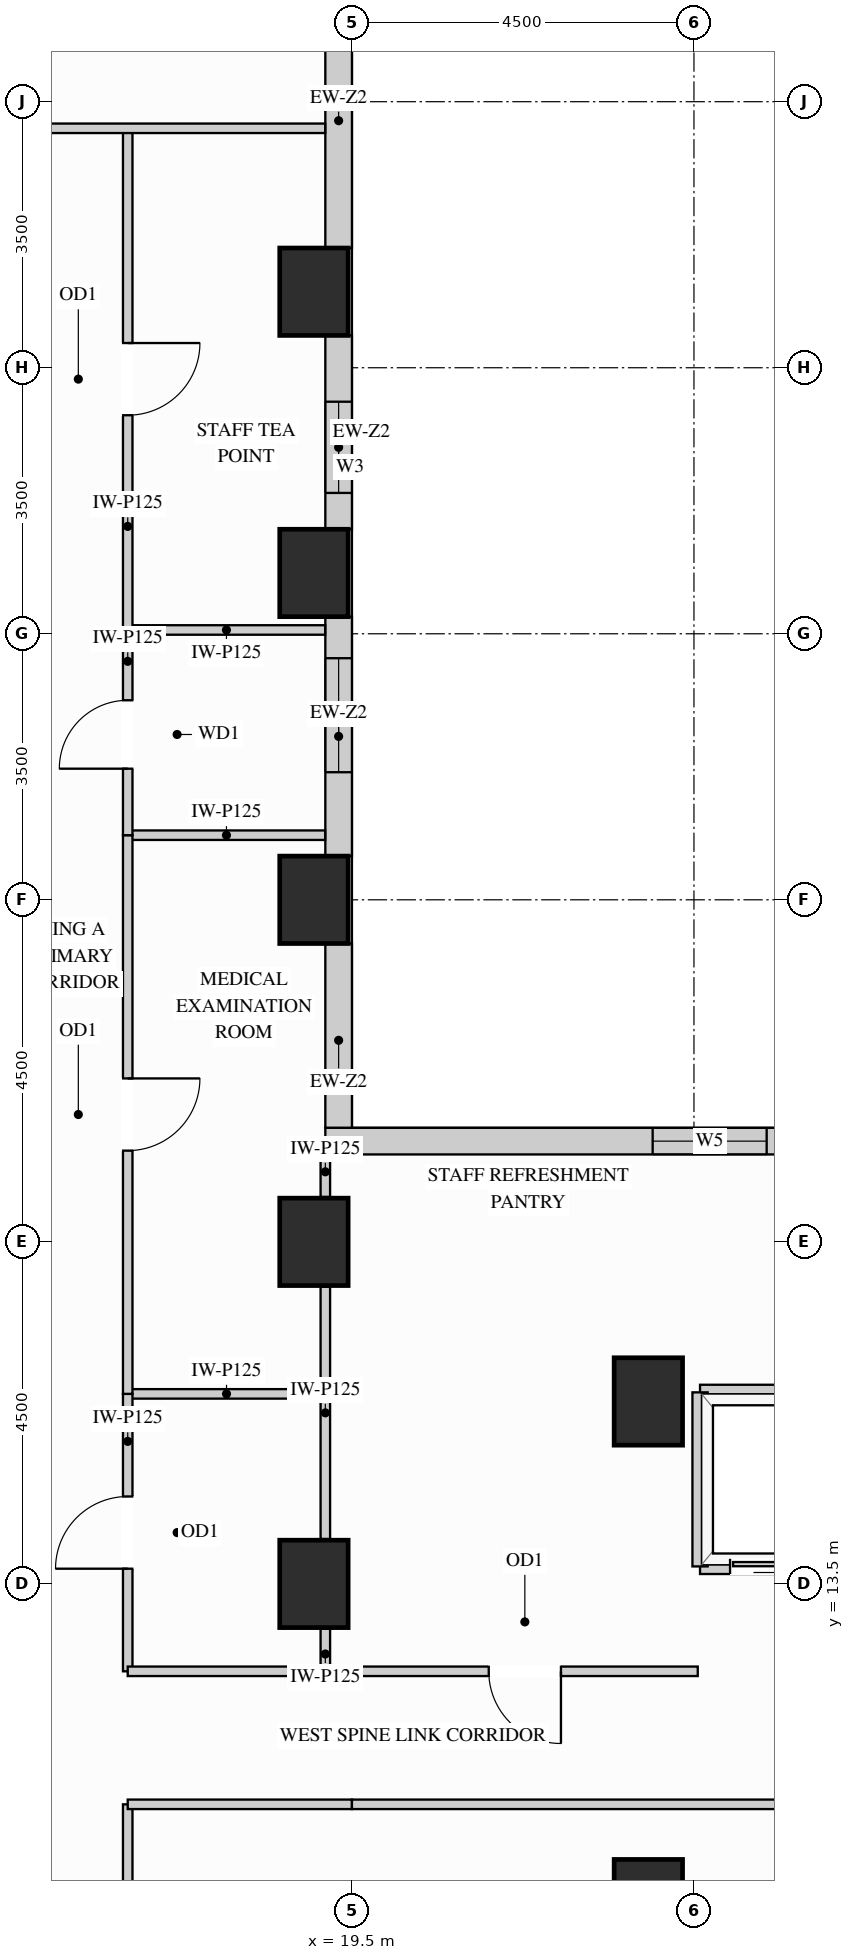
"""IFC4 building model, lengths in metres.
Left out: names, types, materials, properties, quantities, classifications, styles, units other than length and angle.
Written with IfcOpenShell. Run it as: python <this file> out.ifc"""

import sys

from ifc_helpers import new_model, si_unit, direction, frame, frame_2d, origin, origin_2d, place, context, subcontext, project, spatial, rectangle, extrude, source, transform, mapped, element, fill, save


model = new_model("IFC4")
c1 = context("Model", 3, precision=1e-05, world=origin(), true_north=direction((0.0, 1.0)))
c2 = subcontext(c1, "Body", "Model", "MODEL_VIEW")
j1 = project(units=[si_unit("LENGTHUNIT", "METRE"), si_unit("PLANEANGLEUNIT", "RADIAN")], contexts=[c1])
p1 = place(None, origin())
s1 = spatial("IfcSite", under=j1, at=p1, CompositionType="ELEMENT")
p2 = place(p1, origin())
s2 = spatial("IfcBuilding", under=s1, at=p2, CompositionType="ELEMENT")
p3 = place(p2, frame((0.0, 0.0, 91.8)))
s3 = spatial("IfcBuildingStorey", under=s2, at=p3, CompositionType="ELEMENT", Elevation=91.8)
m1 = source(origin(), c2, "Body", "SweptSolid", [
    extrude(rectangle(XDim=0.9, YDim=1.15, at=origin_2d()), origin(), (0.0, 0.0, 1.0), 3.38),
])
for number, where, z_axis, x_axis in (
    (1, (19.0, 13.5, 0.0), (0.0, 0.0, 1.0), (1.0, 0.0, 0.0)),
    (2, (19.0, 18.0, 0.0), (0.0, 0.0, 1.0), (1.0, 0.0, 0.0)),
    (3, (19.0, 22.5, 0.0), (0.0, 0.0, 1.0), (1.0, 0.0, 0.0)),
    (4, (19.0, 26.8, 0.0), (0.0, 0.0, 1.0), (1.0, 0.0, 0.0)),
    (5, (19.0, 30.5, 0.0), (0.0, 0.0, 1.0), (1.0, 0.0, 0.0)),
    (6, (23.4, 15.9, 0.0), (0.0, 0.0, 1.0), (1.0, 0.0, 0.0)),
    (7, (23.4, 9.3, 0.0), (0.0, 0.0, 1.0), (1.0, 0.0, 0.0)),
):
    element("IfcColumn", number, at=place(p3, frame(where, z_axis=z_axis, x_axis=x_axis)), inside=s3, PredefinedType="COLUMN", context=c2, shape_type="MappedRepresentation", body=[
        mapped(m1, transform((0.0, 0.0, 0.0), x_axis=(1.0, 0.0, 0.0), y_axis=(0.0, 1.0, 0.0), z_axis=(0.0, 0.0, 1.0))),
    ])
m2 = source(origin(), c2, "Body", "SweptSolid", [
    extrude(rectangle(XDim=2.429, YDim=0.35, at=frame_2d((1.214, 0.0))), origin(), (0.0, 0.0, 1.0), 2.519),
])
p4 = place(p3, frame((19.325, 19.498, 0.0), z_axis=(0.0, 0.0, 1.0), x_axis=(0.0, 1.0, 0.0)))
e8 = element("IfcWall", 8, at=p4, inside=s3, PredefinedType="SOLIDWALL", context=c2, shape_type="MappedRepresentation", body=[
    mapped(m2, transform((0.0, 0.0, 0.0), x_axis=(1.0, 0.0, 0.0), y_axis=(0.0, 1.0, 0.0), z_axis=(0.0, 0.0, 1.0))),
])
p5 = place(p3, frame((19.325, 23.073, 0.0), z_axis=(0.0, 0.0, 1.0), x_axis=(0.0, 1.0, 0.0)))
e9 = element("IfcWall", 9, at=p5, inside=s3, PredefinedType="SOLIDWALL", context=c2, shape_type="SweptSolid", body=[
    extrude(rectangle(XDim=3.154, YDim=0.35, at=frame_2d((1.577, 0.0))), origin(), (0.0, 0.0, 1.0), 2.519),
])
p6 = place(p5, frame((1.105, 0.0, 0.78)))
e10 = element("IfcOpeningElement", 10, at=p6, cuts=e9, PredefinedType="OPENING", context=c2, shape_type="SweptSolid", body=[
    extrude(rectangle(XDim=1.5, YDim=1.559, at=frame_2d((0.75, 0.78))), frame((0.0, 0.185, 0.0), z_axis=(0.0, -1.0, 0.0), x_axis=(1.0, 0.0, 0.0)), (0.0, 0.0, 1.0), 0.37),
])
p7 = place(p3, frame((19.325, 27.373, 0.0), z_axis=(0.0, 0.0, 1.0), x_axis=(0.0, 1.0, 0.0)))
e11 = element("IfcWall", 11, at=p7, inside=s3, PredefinedType="SOLIDWALL", context=c2, shape_type="SweptSolid", body=[
    extrude(rectangle(XDim=2.554, YDim=0.35, at=frame_2d((1.277, 0.0))), origin(), (0.0, 0.0, 1.0), 2.519),
])
p8 = place(p7, frame((0.48, 0.0, 0.78)))
e12 = element("IfcOpeningElement", 12, at=p8, cuts=e11, PredefinedType="OPENING", context=c2, shape_type="SweptSolid", body=[
    extrude(rectangle(XDim=1.2, YDim=1.559, at=frame_2d((0.6, 0.78))), frame((0.0, 0.185, 0.0), z_axis=(0.0, -1.0, 0.0), x_axis=(1.0, 0.0, 0.0)), (0.0, 0.0, 1.0), 0.37),
])
m3 = source(origin(), c2, "Body", "SweptSolid", [
    extrude(rectangle(XDim=3.354, YDim=0.35, at=frame_2d((1.677, 0.0))), origin(), (0.0, 0.0, 1.0), 2.519),
])
p9 = place(p3, frame((19.325, 31.073, 0.0), z_axis=(0.0, 0.0, 1.0), x_axis=(0.0, 1.0, 0.0)))
e13 = element("IfcWall", 13, at=p9, inside=s3, PredefinedType="SOLIDWALL", context=c2, shape_type="MappedRepresentation", body=[
    mapped(m3, transform((0.0, 0.0, 0.0), x_axis=(1.0, 0.0, 0.0), y_axis=(0.0, 1.0, 0.0), z_axis=(0.0, 0.0, 1.0))),
])
p10 = place(p3, frame((34.75, 19.325, 0.0), z_axis=(0.0, 0.0, 1.0), x_axis=(-1.0, 0.0, 0.0)))
e14 = element("IfcWall", 14, at=p10, inside=s3, PredefinedType="SOLIDWALL", context=c2, shape_type="SweptSolid", body=[
    extrude(rectangle(XDim=15.6, YDim=0.35, at=frame_2d((7.8, 0.0))), origin(), (0.0, 0.0, 1.0), 3.365),
])
p11 = place(p10, frame((4.307, 0.0, 0.78)))
e15 = element("IfcOpeningElement", 15, at=p11, cuts=e14, PredefinedType="OPENING", context=c2, shape_type="SweptSolid", body=[
    extrude(rectangle(XDim=1.5, YDim=2.0, at=frame_2d((0.75, 1.0))), frame((0.0, 0.185, 0.0), z_axis=(0.0, -1.0, 0.0), x_axis=(1.0, 0.0, 0.0)), (0.0, 0.0, 1.0), 0.37),
])
p12 = place(p10, frame((9.793, 0.0, 0.78)))
e16 = element("IfcOpeningElement", 16, at=p12, cuts=e14, PredefinedType="OPENING", context=c2, shape_type="SweptSolid", body=[
    extrude(rectangle(XDim=1.5, YDim=2.0, at=frame_2d((0.75, 1.0))), frame((0.0, 0.185, 0.0), z_axis=(0.0, -1.0, 0.0), x_axis=(1.0, 0.0, 0.0)), (0.0, 0.0, 1.0), 0.37),
])
m4 = source(origin(), c2, "Body", "SweptSolid", [
    extrude(rectangle(XDim=2.6, YDim=0.125, at=frame_2d((1.3, 0.0))), origin(), (0.0, 0.0, 1.0), 3.365),
])
p13 = place(p3, frame((16.55, 16.0, 0.0), z_axis=(0.0, 0.0, 1.0), x_axis=(1.0, 0.0, 0.0)))
e17 = element("IfcWall", 17, at=p13, inside=s3, PredefinedType="PARTITIONING", context=c2, shape_type="MappedRepresentation", body=[
    mapped(m4, transform((0.0, 0.0, 0.0), x_axis=(1.0, 0.0, 0.0), y_axis=(0.0, 1.0, 0.0), z_axis=(0.0, 0.0, 1.0))),
])
m5 = source(origin(), c2, "Body", "SweptSolid", [
    extrude(rectangle(XDim=2.598, YDim=0.125, at=frame_2d((1.299, 0.0))), origin(), (0.0, 0.0, 1.0), 3.365),
])
for number, where, z_axis, x_axis in (
    (18, (16.55, 23.35, 0.0), (0.0, 0.0, 1.0), (1.0, 0.0, 0.0)),
    (19, (16.55, 26.05, 0.0), (0.0, 0.0, 1.0), (1.0, 0.0, 0.0)),
):
    element("IfcWall", number, at=place(p3, frame(where, z_axis=z_axis, x_axis=x_axis)), inside=s3, PredefinedType="PARTITIONING", context=c2, shape_type="MappedRepresentation", body=[
        mapped(m5, transform((0.0, 0.0, 0.0), x_axis=(1.0, 0.0, 0.0), y_axis=(0.0, 1.0, 0.0), z_axis=(0.0, 0.0, 1.0))),
    ])
m6 = source(origin(), c2, "Body", "SweptSolid", [
    extrude(rectangle(XDim=0.56, YDim=0.125, at=frame_2d((0.28, 0.0))), origin(), (0.0, 0.0, 1.0), 2.677),
])
p14 = place(p3, frame((19.15, 12.35, 0.0), z_axis=(0.0, 0.0, 1.0), x_axis=(0.0, 1.0, 0.0)))
e20 = element("IfcWall", 20, at=p14, inside=s3, PredefinedType="PARTITIONING", context=c2, shape_type="MappedRepresentation", body=[
    mapped(m6, transform((0.0, 0.0, 0.0), x_axis=(1.0, 0.0, 0.0), y_axis=(0.0, 1.0, 0.0), z_axis=(0.0, 0.0, 1.0))),
])
m7 = source(origin(), c2, "Body", "SweptSolid", [
    extrude(rectangle(XDim=3.32, YDim=0.125, at=frame_2d((1.66, 0.0))), origin(), (0.0, 0.0, 1.0), 2.677),
])
p15 = place(p3, frame((19.15, 14.09, 0.0), z_axis=(0.0, 0.0, 1.0), x_axis=(0.0, 1.0, 0.0)))
e21 = element("IfcWall", 21, at=p15, inside=s3, PredefinedType="PARTITIONING", context=c2, shape_type="MappedRepresentation", body=[
    mapped(m7, transform((0.0, 0.0, 0.0), x_axis=(1.0, 0.0, 0.0), y_axis=(0.0, 1.0, 0.0), z_axis=(0.0, 0.0, 1.0))),
])
m8 = source(origin(), c2, "Body", "SweptSolid", [
    extrude(rectangle(XDim=0.558, YDim=0.125, at=frame_2d((0.279, 0.0))), origin(), (0.0, 0.0, 1.0), 2.519),
])
p16 = place(p3, frame((19.15, 18.59, 0.0), z_axis=(0.0, 0.0, 1.0), x_axis=(0.0, 1.0, 0.0)))
e22 = element("IfcWall", 22, at=p16, inside=s3, PredefinedType="PARTITIONING", context=c2, shape_type="MappedRepresentation", body=[
    mapped(m8, transform((0.0, 0.0, 0.0), x_axis=(1.0, 0.0, 0.0), y_axis=(0.0, 1.0, 0.0), z_axis=(0.0, 0.0, 1.0))),
])
p17 = place(p3, frame((16.55, 12.35, 0.0), z_axis=(0.0, 0.0, 1.0), x_axis=(0.0, 1.0, 0.0)))
e23 = element("IfcWall", 23, at=p17, inside=s3, PredefinedType="PARTITIONING", context=c2, shape_type="SweptSolid", body=[
    extrude(rectangle(XDim=3.65, YDim=0.125, at=frame_2d((1.825, 0.0))), origin(), (0.0, 0.0, 1.0), 3.365),
])
p18 = place(p17, frame((1.35, 0.0, 0.0)))
e24 = element("IfcOpeningElement", 24, at=p18, cuts=e23, PredefinedType="OPENING", context=c2, shape_type="SweptSolid", body=[
    extrude(rectangle(XDim=0.95, YDim=2.15, at=frame_2d((0.475, 1.075))), frame((0.0, 0.073, 0.0), z_axis=(0.0, -1.0, 0.0), x_axis=(1.0, 0.0, 0.0)), (0.0, 0.0, 1.0), 0.145),
])
p19 = place(p3, frame((16.55, 16.0, 0.0), z_axis=(0.0, 0.0, 1.0), x_axis=(0.0, 1.0, 0.0)))
e25 = element("IfcWall", 25, at=p19, inside=s3, PredefinedType="PARTITIONING", context=c2, shape_type="SweptSolid", body=[
    extrude(rectangle(XDim=7.35, YDim=0.125, at=frame_2d((3.675, 0.0))), origin(), (0.0, 0.0, 1.0), 3.365),
])
p20 = place(p19, frame((3.2, 0.0, 0.0)))
e26 = element("IfcOpeningElement", 26, at=p20, cuts=e25, PredefinedType="OPENING", context=c2, shape_type="SweptSolid", body=[
    extrude(rectangle(XDim=0.95, YDim=2.15, at=frame_2d((0.475, 1.075))), frame((0.0, 0.073, 0.0), z_axis=(0.0, -1.0, 0.0), x_axis=(1.0, 0.0, 0.0)), (0.0, 0.0, 1.0), 0.145),
])
p21 = place(p3, frame((16.55, 26.05, 0.0), z_axis=(0.0, 0.0, 1.0), x_axis=(0.0, 1.0, 0.0)))
e27 = element("IfcWall", 27, at=p21, inside=s3, PredefinedType="PARTITIONING", context=c2, shape_type="SweptSolid", body=[
    extrude(rectangle(XDim=6.6, YDim=0.125, at=frame_2d((3.3, 0.0))), origin(), (0.0, 0.0, 1.0), 3.365),
])
p22 = place(p21, frame((2.825, 0.0, 0.0)))
e28 = element("IfcOpeningElement", 28, at=p22, cuts=e27, PredefinedType="OPENING", context=c2, shape_type="SweptSolid", body=[
    extrude(rectangle(XDim=0.95, YDim=2.15, at=frame_2d((0.475, 1.075))), frame((0.0, 0.073, 0.0), z_axis=(0.0, -1.0, 0.0), x_axis=(1.0, 0.0, 0.0)), (0.0, 0.0, 1.0), 0.145),
])
p23 = place(p3, frame((16.55, 5.8, 0.0), z_axis=(0.0, 0.0, 1.0), x_axis=(0.0, 1.0, 0.0)))
e29 = element("IfcWall", 29, at=p23, inside=s3, PredefinedType="PARTITIONING", context=c2, shape_type="SweptSolid", body=[
    extrude(rectangle(XDim=4.8, YDim=0.125, at=frame_2d((2.4, 0.0))), origin(), (0.0, 0.0, 1.0), 3.365),
])
p24 = place(p23, frame((1.925, 0.0, 0.0)))
e30 = element("IfcOpeningElement", 30, at=p24, cuts=e29, PredefinedType="OPENING", context=c2, shape_type="SweptSolid", body=[
    extrude(rectangle(XDim=0.95, YDim=2.15, at=frame_2d((0.475, 1.075))), frame((0.0, 0.073, 0.0), z_axis=(0.0, -1.0, 0.0), x_axis=(1.0, 0.0, 0.0)), (0.0, 0.0, 1.0), 0.145),
])
p25 = place(p3, frame((16.55, 23.35, 0.0), z_axis=(0.0, 0.0, 1.0), x_axis=(0.0, 1.0, 0.0)))
e31 = element("IfcWall", 31, at=p25, inside=s3, PredefinedType="PARTITIONING", context=c2, shape_type="SweptSolid", body=[
    extrude(rectangle(XDim=2.7, YDim=0.125, at=frame_2d((1.35, 0.0))), origin(), (0.0, 0.0, 1.0), 3.365),
])
p26 = place(p25, frame((0.875, 0.0, 0.0)))
e32 = element("IfcOpeningElement", 32, at=p26, cuts=e31, PredefinedType="OPENING", context=c2, shape_type="SweptSolid", body=[
    extrude(rectangle(XDim=0.9, YDim=2.15, at=frame_2d((0.45, 1.075))), frame((0.0, 0.073, 0.0), z_axis=(0.0, -1.0, 0.0), x_axis=(1.0, 0.0, 0.0)), (0.0, 0.0, 1.0), 0.145),
])
m9 = source(origin(), c2, "Body", "SweptSolid", [
    extrude(rectangle(XDim=5.798, YDim=0.125, at=frame_2d((2.899, 0.0))), origin(), (0.0, 0.0, 1.0), 3.365),
])
p27 = place(p3, frame((13.35, 32.65, 0.0), z_axis=(0.0, 0.0, 1.0), x_axis=(1.0, 0.0, 0.0)))
e33 = element("IfcWall", 33, at=p27, inside=s3, PredefinedType="PARTITIONING", context=c2, shape_type="MappedRepresentation", body=[
    mapped(m9, transform((0.0, 0.0, 0.0), x_axis=(1.0, 0.0, 0.0), y_axis=(0.0, 1.0, 0.0), z_axis=(0.0, 0.0, 1.0))),
])
m10 = source(origin(), c2, "Body", "SweptSolid", [
    extrude(rectangle(XDim=2.95, YDim=0.125, at=frame_2d((1.475, 0.0))), origin(), (0.0, 0.0, 1.0), 3.365),
])
p28 = place(p3, frame((16.55, 12.35, 0.0), z_axis=(0.0, 0.0, 1.0), x_axis=(1.0, 0.0, 0.0)))
e34 = element("IfcWall", 34, at=p28, inside=s3, PredefinedType="PARTITIONING", context=c2, shape_type="MappedRepresentation", body=[
    mapped(m10, transform((0.0, 0.0, 0.0), x_axis=(1.0, 0.0, 0.0), y_axis=(0.0, 1.0, 0.0), z_axis=(0.0, 0.0, 1.0))),
])
p29 = place(p3, frame((19.5, 12.35, 0.0), z_axis=(0.0, 0.0, 1.0), x_axis=(1.0, 0.0, 0.0)))
e35 = element("IfcWall", 35, at=p29, inside=s3, PredefinedType="PARTITIONING", context=c2, shape_type="SweptSolid", body=[
    extrude(rectangle(XDim=4.55, YDim=0.125, at=frame_2d((2.275, 0.0))), origin(), (0.0, 0.0, 1.0), 3.365),
])
p30 = place(p29, frame((1.8, 0.0, 0.0)))
e36 = element("IfcOpeningElement", 36, at=p30, cuts=e35, PredefinedType="OPENING", context=c2, shape_type="SweptSolid", body=[
    extrude(rectangle(XDim=0.95, YDim=2.15, at=frame_2d((0.475, 1.075))), frame((0.0, 0.073, 0.0), z_axis=(0.0, -1.0, 0.0), x_axis=(1.0, 0.0, 0.0)), (0.0, 0.0, 1.0), 0.145),
])
p31 = place(p3, frame((16.55, 10.6, 0.0), z_axis=(0.0, 0.0, 1.0), x_axis=(1.0, 0.0, 0.0)))
e37 = element("IfcWall", 37, at=p31, inside=s3, PredefinedType="PARTITIONING", context=c2, shape_type="MappedRepresentation", body=[
    mapped(m10, transform((0.0, 0.0, 0.0), x_axis=(1.0, 0.0, 0.0), y_axis=(0.0, 1.0, 0.0), z_axis=(0.0, 0.0, 1.0))),
])
p32 = place(p3, frame((19.5, 10.6, 0.0), z_axis=(0.0, 0.0, 1.0), x_axis=(1.0, 0.0, 0.0)))
e38 = element("IfcWall", 38, at=p32, inside=s3, PredefinedType="PARTITIONING", context=c2, shape_type="SweptSolid", body=[
    extrude(rectangle(XDim=14.9, YDim=0.125, at=frame_2d((7.45, 0.0))), origin(), (0.0, 0.0, 1.0), 3.365),
])
p33 = place(p32, frame((6.975, 0.0, 0.0)))
e39 = element("IfcOpeningElement", 39, at=p33, cuts=e38, PredefinedType="OPENING", context=c2, shape_type="SweptSolid", body=[
    extrude(rectangle(XDim=0.95, YDim=2.15, at=frame_2d((0.475, 1.075))), frame((0.0, 0.073, 0.0), z_axis=(0.0, -1.0, 0.0), x_axis=(1.0, 0.0, 0.0)), (0.0, 0.0, 1.0), 0.145),
])
m11 = source(origin(), c2, "Body", "SweptSolid", [
    extrude(rectangle(XDim=1.89, YDim=0.2, at=frame_2d((0.945, 0.0))), origin(), (0.0, 0.0, 1.0), 2.677),
])
p34 = place(p3, frame((24.08, 16.02, 0.0), z_axis=(0.0, 0.0, 1.0), x_axis=(1.0, 0.0, 0.0)))
e40 = element("IfcWall", 40, at=p34, inside=s3, PredefinedType="PARTITIONING", context=c2, shape_type="MappedRepresentation", body=[
    mapped(m11, transform((0.0, 0.0, 0.0), x_axis=(1.0, 0.0, 0.0), y_axis=(0.0, 1.0, 0.0), z_axis=(0.0, 0.0, 1.0))),
])
p35 = place(p3, frame((24.08, 13.73, 0.0), z_axis=(0.0, 0.0, 1.0), x_axis=(1.0, 0.0, 0.0)))
e41 = element("IfcWall", 41, at=p35, inside=s3, PredefinedType="PARTITIONING", context=c2, shape_type="SweptSolid", body=[
    extrude(rectangle(XDim=1.89, YDim=0.2, at=frame_2d((0.945, 0.0))), origin(), (0.0, 0.0, 1.0), 2.446),
])
p36 = place(p35, frame((0.395, 0.0, 0.0)))
e42 = element("IfcOpeningElement", 42, at=p36, cuts=e41, PredefinedType="OPENING", context=c2, shape_type="SweptSolid", body=[
    extrude(rectangle(XDim=1.1, YDim=2.2, at=frame_2d((0.55, 1.1))), frame((0.0, 0.11, 0.0), z_axis=(0.0, -1.0, 0.0), x_axis=(1.0, 0.0, 0.0)), (0.0, 0.0, 1.0), 0.22),
])
m12 = source(origin(), c2, "Body", "SweptSolid", [
    extrude(rectangle(XDim=2.29, YDim=0.2, at=frame_2d((1.145, 0.0))), origin(), (0.0, 0.0, 1.0), 3.365),
])
p37 = place(p3, frame((24.08, 13.73, 0.0), z_axis=(0.0, 0.0, 1.0), x_axis=(0.0, 1.0, 0.0)))
e43 = element("IfcWall", 43, at=p37, inside=s3, PredefinedType="PARTITIONING", context=c2, shape_type="MappedRepresentation", body=[
    mapped(m12, transform((0.0, 0.0, 0.0), x_axis=(1.0, 0.0, 0.0), y_axis=(0.0, 1.0, 0.0), z_axis=(0.0, 0.0, 1.0))),
])
m13 = source(origin(), c2, "Body", "SweptSolid", [
    extrude(rectangle(XDim=1.1, YDim=2.2, at=frame_2d((0.55, 1.1))), frame((0.0, 0.025, 0.0), z_axis=(0.0, -1.0, 0.0), x_axis=(1.0, 0.0, 0.0)), (0.0, 0.0, 1.0), 0.05),
])
p38 = place(p36, origin())
e44 = element("IfcDoor", 44, at=p38, inside=s3, OperationType="SLIDING_TO_LEFT", PredefinedType="DOOR", context=c2, shape_type="MappedRepresentation", body=[
    mapped(m13, transform((0.0, 0.0, 0.0), x_axis=(1.0, 0.0, 0.0), y_axis=(0.0, 1.0, 0.0), z_axis=(0.0, 0.0, 1.0))),
])
fill(e42, e44)
m14 = source(origin(), c2, "Body", "SweptSolid", [
    extrude(rectangle(XDim=0.95, YDim=2.15, at=frame_2d((0.475, 1.075))), frame((0.0, 0.025, 0.0), z_axis=(0.0, -1.0, 0.0), x_axis=(1.0, 0.0, 0.0)), (0.0, 0.0, 1.0), 0.05),
])
p39 = place(p18, origin())
e45 = element("IfcDoor", 45, at=p39, inside=s3, OperationType="SINGLE_SWING_LEFT", PredefinedType="DOOR", context=c2, shape_type="MappedRepresentation", body=[
    mapped(m14, transform((0.0, 0.0, 0.0), x_axis=(1.0, 0.0, 0.0), y_axis=(0.0, 1.0, 0.0), z_axis=(0.0, 0.0, 1.0))),
])
fill(e24, e45)
p40 = place(p20, origin())
e46 = element("IfcDoor", 46, at=p40, inside=s3, OperationType="SINGLE_SWING_RIGHT", PredefinedType="DOOR", context=c2, shape_type="MappedRepresentation", body=[
    mapped(m14, transform((0.0, 0.0, 0.0), x_axis=(1.0, 0.0, 0.0), y_axis=(0.0, 1.0, 0.0), z_axis=(0.0, 0.0, 1.0))),
])
fill(e26, e46)
p41 = place(p22, origin())
e47 = element("IfcDoor", 47, at=p41, inside=s3, OperationType="SINGLE_SWING_RIGHT", PredefinedType="DOOR", context=c2, shape_type="MappedRepresentation", body=[
    mapped(m14, transform((0.0, 0.0, 0.0), x_axis=(1.0, 0.0, 0.0), y_axis=(0.0, 1.0, 0.0), z_axis=(0.0, 0.0, 1.0))),
])
fill(e28, e47)
p42 = place(p30, origin())
e48 = element("IfcDoor", 48, at=p42, inside=s3, OperationType="SINGLE_SWING_RIGHT", PredefinedType="DOOR", context=c2, shape_type="MappedRepresentation", body=[
    mapped(m14, transform((0.0, 0.0, 0.0), x_axis=(1.0, 0.0, 0.0), y_axis=(0.0, 1.0, 0.0), z_axis=(0.0, 0.0, 1.0))),
])
fill(e36, e48)
m15 = source(origin(), c2, "Body", "SweptSolid", [
    extrude(rectangle(XDim=0.9, YDim=2.15, at=frame_2d((0.45, 1.075))), frame((0.0, 0.025, 0.0), z_axis=(0.0, -1.0, 0.0), x_axis=(1.0, 0.0, 0.0)), (0.0, 0.0, 1.0), 0.05),
])
p43 = place(p26, origin())
e49 = element("IfcDoor", 49, at=p43, inside=s3, OperationType="SINGLE_SWING_LEFT", PredefinedType="DOOR", context=c2, shape_type="MappedRepresentation", body=[
    mapped(m15, transform((0.0, 0.0, 0.0), x_axis=(1.0, 0.0, 0.0), y_axis=(0.0, 1.0, 0.0), z_axis=(0.0, 0.0, 1.0))),
])
fill(e32, e49)
m16 = source(origin(), c2, "Body", "SweptSolid", [
    extrude(rectangle(XDim=1.2, YDim=1.559, at=frame_2d((0.6, 0.78))), frame((0.0, 0.03, 0.0), z_axis=(0.0, -1.0, 0.0), x_axis=(1.0, 0.0, 0.0)), (0.0, 0.0, 1.0), 0.06),
])
p44 = place(p8, origin())
e50 = element("IfcWindow", 50, at=p44, inside=s3, PartitioningType="SINGLE_PANEL", PredefinedType="WINDOW", context=c2, shape_type="MappedRepresentation", body=[
    mapped(m16, transform((0.0, 0.0, 0.0), x_axis=(1.0, 0.0, 0.0), y_axis=(0.0, 1.0, 0.0), z_axis=(0.0, 0.0, 1.0))),
])
fill(e12, e50)
m17 = source(origin(), c2, "Body", "SweptSolid", [
    extrude(rectangle(XDim=1.5, YDim=1.559, at=frame_2d((0.75, 0.78))), frame((0.0, 0.03, 0.0), z_axis=(0.0, -1.0, 0.0), x_axis=(1.0, 0.0, 0.0)), (0.0, 0.0, 1.0), 0.06),
])
p45 = place(p6, origin())
e51 = element("IfcWindow", 51, at=p45, inside=s3, PartitioningType="SINGLE_PANEL", PredefinedType="WINDOW", context=c2, shape_type="MappedRepresentation", body=[
    mapped(m17, transform((0.0, 0.0, 0.0), x_axis=(1.0, 0.0, 0.0), y_axis=(0.0, 1.0, 0.0), z_axis=(0.0, 0.0, 1.0))),
])
fill(e10, e51)
m18 = source(origin(), c2, "Body", "SweptSolid", [
    extrude(rectangle(XDim=1.5, YDim=2.0, at=frame_2d((0.75, 1.0))), frame((0.0, 0.03, 0.0), z_axis=(0.0, -1.0, 0.0), x_axis=(1.0, 0.0, 0.0)), (0.0, 0.0, 1.0), 0.06),
])
p46 = place(p12, origin())
e52 = element("IfcWindow", 52, at=p46, inside=s3, PartitioningType="SINGLE_PANEL", PredefinedType="WINDOW", context=c2, shape_type="MappedRepresentation", body=[
    mapped(m18, transform((0.0, 0.0, 0.0), x_axis=(1.0, 0.0, 0.0), y_axis=(0.0, 1.0, 0.0), z_axis=(0.0, 0.0, 1.0))),
])
fill(e16, e52)
save(model, sys.argv[1])
